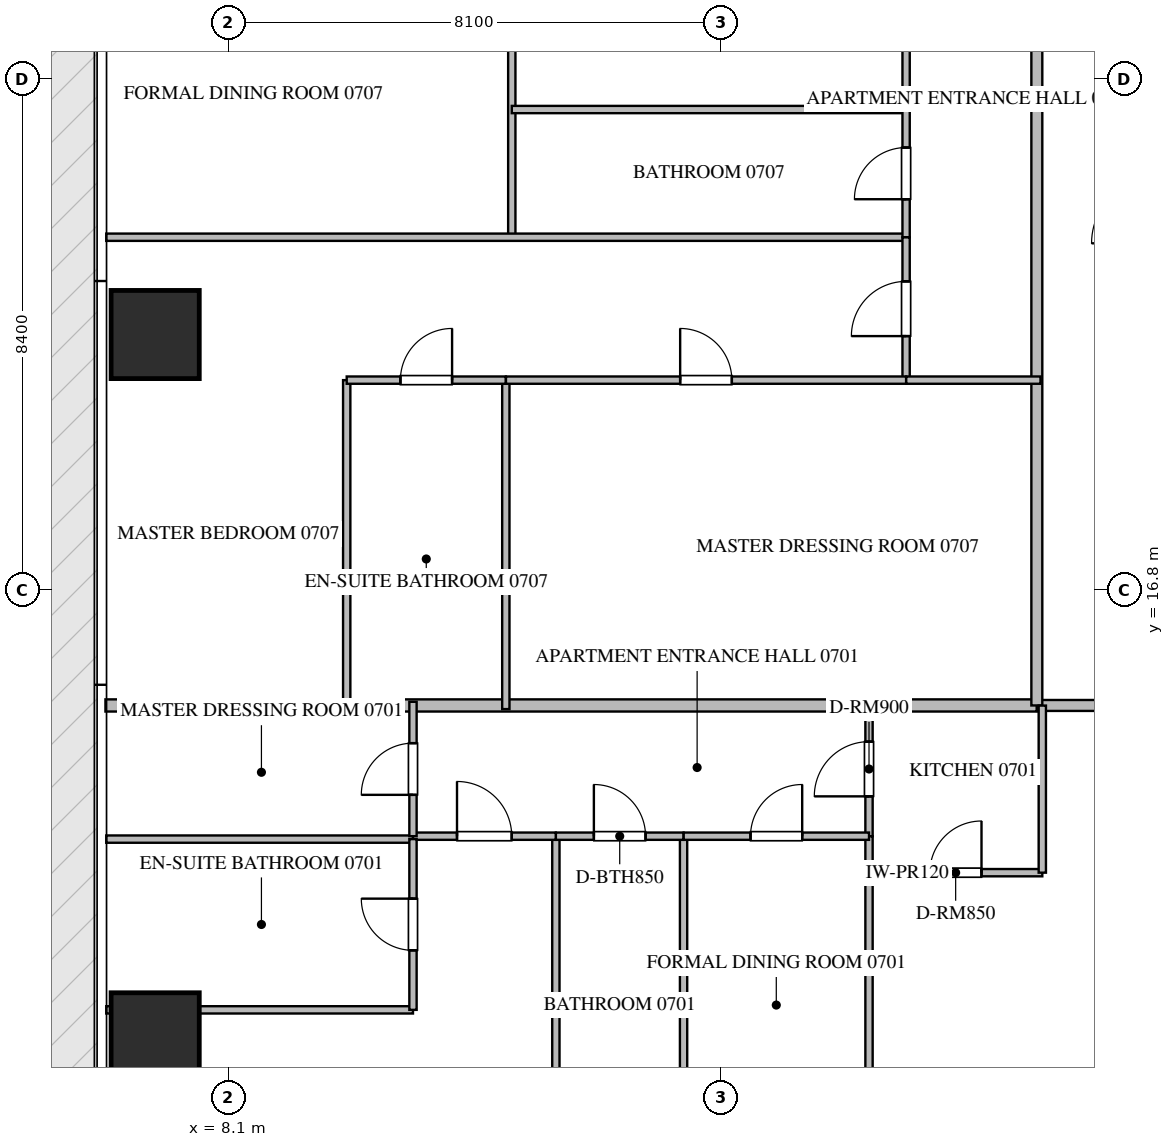
"""IFC4 building model, lengths in metres.
Left out: names, types, materials, properties, quantities, classifications, styles, units other than length and angle.
Written with IfcOpenShell. Run it as: python <this file> out.ifc"""

import sys

from ifc_helpers import new_model, si_unit, direction, frame, frame_2d, origin, origin_2d, place, context, subcontext, project, spatial, rectangle, extrude, source, transform, mapped, element, fill, save


model = new_model("IFC4")
c1 = context("Model", 3, precision=1e-05, world=origin(), true_north=direction((0.0, 1.0)))
c2 = subcontext(c1, "Body", "Model", "MODEL_VIEW")
j1 = project(units=[si_unit("LENGTHUNIT", "METRE"), si_unit("PLANEANGLEUNIT", "RADIAN")], contexts=[c1])
p1 = place(None, origin())
s1 = spatial("IfcSite", under=j1, at=p1, CompositionType="ELEMENT")
p2 = place(p1, origin())
s2 = spatial("IfcBuilding", under=s1, at=p2, CompositionType="ELEMENT")
p3 = place(p2, frame((0.0, 0.0, 34.2)))
s3 = spatial("IfcBuildingStorey", under=s2, at=p3, CompositionType="ELEMENT", Elevation=34.2)
m1 = source(origin(), c2, "Body", "SweptSolid", [
    extrude(rectangle(XDim=1.45, YDim=1.45, at=origin_2d()), origin(), (0.0, 0.0, 1.0), 3.75),
])
for number, where, z_axis, x_axis in (
    (1, (6.9, 9.45, -0.26), (0.0, 0.0, 1.0), (1.0, 0.0, 0.0)),
    (2, (6.9, 21.0, -0.26), (0.0, 0.0, 1.0), (1.0, 0.0, 0.0)),
):
    element("IfcColumn", number, at=place(p3, frame(where, z_axis=z_axis, x_axis=x_axis)), inside=s3, PredefinedType="COLUMN", context=c2, shape_type="MappedRepresentation", body=[
        mapped(m1, transform((0.0, 0.0, 0.0), scale=1.0)),
    ])
p4 = place(p3, frame((6.082, 14.9, 0.0), z_axis=(0.0, 0.0, 1.0), x_axis=(1.0, 0.0, 0.0)))
e3 = element("IfcWall", 3, at=p4, inside=s3, PredefinedType="PARTITIONING", context=c2, shape_type="SweptSolid", body=[
    extrude(rectangle(XDim=15.318, YDim=0.2, at=frame_2d((7.659, 0.0))), origin(), (0.0, 0.0, 1.0), 3.49),
])
p5 = place(p3, frame((21.402, 14.9, 0.0), z_axis=(0.0, 0.0, 1.0), x_axis=(1.0, 0.0, 0.0)))
e4 = element("IfcWall", 4, at=p5, inside=s3, PredefinedType="PARTITIONING", context=c2, shape_type="SweptSolid", body=[
    extrude(rectangle(XDim=21.996, YDim=0.18, at=frame_2d((10.998, 0.0))), origin(), (0.0, 0.0, 1.0), 3.49),
])
p6 = place(p5, frame((2.1, 0.0, 0.0)))
e5 = element("IfcOpeningElement", 5, at=p6, cuts=e4, PredefinedType="OPENING", context=c2, shape_type="SweptSolid", body=[
    extrude(rectangle(XDim=1.0, YDim=2.15, at=frame_2d((0.5, 1.075))), frame((0.0, 0.1, 0.0), z_axis=(0.0, -1.0, 0.0), x_axis=(1.0, 0.0, 0.0)), (0.0, 0.0, 1.0), 0.2),
])
p7 = place(p5, frame((6.719, 0.0, 0.0)))
e6 = element("IfcOpeningElement", 6, at=p7, cuts=e4, PredefinedType="OPENING", context=c2, shape_type="SweptSolid", body=[
    extrude(rectangle(XDim=1.0, YDim=2.15, at=frame_2d((0.5, 1.075))), frame((0.0, 0.1, 0.0), z_axis=(0.0, -1.0, 0.0), x_axis=(1.0, 0.0, 0.0)), (0.0, 0.0, 1.0), 0.2),
])
p8 = place(p5, frame((18.896, 0.0, 0.0)))
e7 = element("IfcOpeningElement", 7, at=p8, cuts=e4, PredefinedType="OPENING", context=c2, shape_type="SweptSolid", body=[
    extrude(rectangle(XDim=1.0, YDim=2.15, at=frame_2d((0.5, 1.075))), frame((0.0, 0.1, 0.0), z_axis=(0.0, -1.0, 0.0), x_axis=(1.0, 0.0, 0.0)), (0.0, 0.0, 1.0), 0.2),
])
p9 = place(p3, frame((21.4, 14.9, 0.0), z_axis=(0.0, 0.0, 1.0), x_axis=(0.0, 1.0, 0.0)))
e8 = element("IfcWall", 8, at=p9, inside=s3, PredefinedType="PARTITIONING", context=c2, shape_type="SweptSolid", body=[
    extrude(rectangle(XDim=20.6, YDim=0.18, at=frame_2d((10.3, 0.0))), origin(), (0.0, 0.0, 1.0), 3.49),
])
p10 = place(p9, frame((17.64, 0.0, 0.0)))
e9 = element("IfcOpeningElement", 9, at=p10, cuts=e8, PredefinedType="OPENING", context=c2, shape_type="SweptSolid", body=[
    extrude(rectangle(XDim=1.0, YDim=2.15, at=frame_2d((0.5, 1.075))), frame((0.0, 0.1, 0.0), z_axis=(0.0, -1.0, 0.0), x_axis=(1.0, 0.0, 0.0)), (0.0, 0.0, 1.0), 0.2),
])
p11 = place(p3, frame((18.64, 12.15, 0.0), z_axis=(0.0, 0.0, 1.0), x_axis=(1.0, 0.0, 0.0)))
e10 = element("IfcWall", 10, at=p11, inside=s3, PredefinedType="PARTITIONING", context=c2, shape_type="SweptSolid", body=[
    extrude(rectangle(XDim=2.85, YDim=0.12, at=frame_2d((1.425, 0.0))), origin(), (0.0, 0.0, 1.0), 3.49),
])
p12 = place(p11, frame((1.0, 0.0, 0.0)))
e11 = element("IfcOpeningElement", 11, at=p12, cuts=e10, PredefinedType="OPENING", context=c2, shape_type="SweptSolid", body=[
    extrude(rectangle(XDim=0.85, YDim=2.1, at=frame_2d((0.425, 1.05))), frame((0.0, 0.07, 0.0), z_axis=(0.0, -1.0, 0.0), x_axis=(1.0, 0.0, 0.0)), (0.0, 0.0, 1.0), 0.14),
])
p13 = place(p3, frame((21.49, 12.15, 0.0), z_axis=(0.0, 0.0, 1.0), x_axis=(0.0, 1.0, 0.0)))
e12 = element("IfcWall", 12, at=p13, inside=s3, PredefinedType="PARTITIONING", context=c2, shape_type="SweptSolid", body=[
    extrude(rectangle(XDim=2.748, YDim=0.12, at=frame_2d((1.374, 0.0))), origin(), (0.0, 0.0, 1.0), 3.49),
])
p14 = place(p3, frame((18.64, 12.75, 0.0), z_axis=(0.0, 0.0, 1.0), x_axis=(0.0, 1.0, 0.0)))
e13 = element("IfcWall", 13, at=p14, inside=s3, PredefinedType="PARTITIONING", context=c2, shape_type="SweptSolid", body=[
    extrude(rectangle(XDim=2.21, YDim=0.12, at=frame_2d((1.105, 0.0))), origin(), (0.0, 0.0, 1.0), 3.49),
])
p15 = place(p14, frame((0.655, 0.0, 0.0)))
e14 = element("IfcOpeningElement", 14, at=p15, cuts=e13, PredefinedType="OPENING", context=c2, shape_type="SweptSolid", body=[
    extrude(rectangle(XDim=0.9, YDim=2.1, at=frame_2d((0.45, 1.05))), frame((0.0, 0.07, 0.0), z_axis=(0.0, -1.0, 0.0), x_axis=(1.0, 0.0, 0.0)), (0.0, 0.0, 1.0), 0.14),
])
p16 = place(p3, frame((18.64, 7.73, 0.0), z_axis=(0.0, 0.0, 1.0), x_axis=(0.0, 1.0, 0.0)))
e15 = element("IfcWall", 15, at=p16, inside=s3, PredefinedType="PARTITIONING", context=c2, shape_type="SweptSolid", body=[
    extrude(rectangle(XDim=5.018, YDim=0.12, at=frame_2d((2.509, 0.0))), origin(), (0.0, 0.0, 1.0), 3.49),
])
p17 = place(p3, frame((13.49, 4.495, 0.0), z_axis=(0.0, 0.0, 1.0), x_axis=(0.0, 1.0, 0.0)))
e16 = element("IfcWall", 16, at=p17, inside=s3, PredefinedType="PARTITIONING", context=c2, shape_type="SweptSolid", body=[
    extrude(rectangle(XDim=8.255, YDim=0.12, at=frame_2d((4.127, 0.0))), origin(), (0.0, 0.0, 1.0), 3.49),
])
p18 = place(p3, frame((15.59, 7.728, 0.0), z_axis=(0.0, 0.0, 1.0), x_axis=(0.0, 1.0, 0.0)))
e17 = element("IfcWall", 17, at=p18, inside=s3, PredefinedType="PARTITIONING", context=c2, shape_type="SweptSolid", body=[
    extrude(rectangle(XDim=5.022, YDim=0.12, at=frame_2d((2.511, 0.0))), origin(), (0.0, 0.0, 1.0), 3.49),
])
p19 = place(p3, frame((13.49, 12.75, 0.0), z_axis=(0.0, 0.0, 1.0), x_axis=(1.0, 0.0, 0.0)))
e18 = element("IfcWall", 18, at=p19, inside=s3, PredefinedType="PARTITIONING", context=c2, shape_type="SweptSolid", body=[
    extrude(rectangle(XDim=2.1, YDim=0.12, at=frame_2d((1.05, 0.0))), origin(), (0.0, 0.0, 1.0), 3.49),
])
p20 = place(p19, frame((0.625, 0.0, 0.0)))
e19 = element("IfcOpeningElement", 19, at=p20, cuts=e18, PredefinedType="OPENING", context=c2, shape_type="SweptSolid", body=[
    extrude(rectangle(XDim=0.85, YDim=2.1, at=frame_2d((0.425, 1.05))), frame((0.0, 0.07, 0.0), z_axis=(0.0, -1.0, 0.0), x_axis=(1.0, 0.0, 0.0)), (0.0, 0.0, 1.0), 0.14),
])
p21 = place(p3, frame((15.592, 12.75, 0.0), z_axis=(0.0, 0.0, 1.0), x_axis=(1.0, 0.0, 0.0)))
e20 = element("IfcWall", 20, at=p21, inside=s3, PredefinedType="PARTITIONING", context=c2, shape_type="SweptSolid", body=[
    extrude(rectangle(XDim=3.048, YDim=0.12, at=frame_2d((1.524, 0.0))), origin(), (0.0, 0.0, 1.0), 3.49),
])
p22 = place(p21, frame((1.099, 0.0, 0.0)))
e21 = element("IfcOpeningElement", 21, at=p22, cuts=e20, PredefinedType="OPENING", context=c2, shape_type="SweptSolid", body=[
    extrude(rectangle(XDim=0.85, YDim=2.1, at=frame_2d((0.425, 1.05))), frame((0.0, 0.07, 0.0), z_axis=(0.0, -1.0, 0.0), x_axis=(1.0, 0.0, 0.0)), (0.0, 0.0, 1.0), 0.14),
])
p23 = place(p3, frame((11.14, 12.75, 0.0), z_axis=(0.0, 0.0, 1.0), x_axis=(1.0, 0.0, 0.0)))
e22 = element("IfcWall", 22, at=p23, inside=s3, PredefinedType="PARTITIONING", context=c2, shape_type="SweptSolid", body=[
    extrude(rectangle(XDim=2.348, YDim=0.12, at=frame_2d((1.174, 0.0))), origin(), (0.0, 0.0, 1.0), 3.49),
])
p24 = place(p23, frame((0.724, 0.0, 0.0)))
e23 = element("IfcOpeningElement", 23, at=p24, cuts=e22, PredefinedType="OPENING", context=c2, shape_type="SweptSolid", body=[
    extrude(rectangle(XDim=0.9, YDim=2.1, at=frame_2d((0.45, 1.05))), frame((0.0, 0.07, 0.0), z_axis=(0.0, -1.0, 0.0), x_axis=(1.0, 0.0, 0.0)), (0.0, 0.0, 1.0), 0.14),
])
p25 = place(p3, frame((6.095, 9.894, 0.0), z_axis=(0.0, 0.0, 1.0), x_axis=(1.0, 0.0, 0.0)))
e24 = element("IfcWall", 24, at=p25, inside=s3, PredefinedType="PARTITIONING", context=c2, shape_type="SweptSolid", body=[
    extrude(rectangle(XDim=5.045, YDim=0.12, at=frame_2d((2.522, 0.0))), origin(), (0.0, 0.0, 1.0), 3.49),
])
p26 = place(p3, frame((6.095, 12.702, 0.0), z_axis=(0.0, 0.0, 1.0), x_axis=(1.0, 0.0, 0.0)))
e25 = element("IfcWall", 25, at=p26, inside=s3, PredefinedType="PARTITIONING", context=c2, shape_type="SweptSolid", body=[
    extrude(rectangle(XDim=5.043, YDim=0.12, at=frame_2d((2.521, 0.0))), origin(), (0.0, 0.0, 1.0), 3.49),
])
p27 = place(p3, frame((11.14, 9.894, 0.0), z_axis=(0.0, 0.0, 1.0), x_axis=(0.0, 1.0, 0.0)))
e26 = element("IfcWall", 26, at=p27, inside=s3, PredefinedType="PARTITIONING", context=c2, shape_type="SweptSolid", body=[
    extrude(rectangle(XDim=2.808, YDim=0.12, at=frame_2d((1.404, 0.0))), origin(), (0.0, 0.0, 1.0), 3.49),
])
p28 = place(p27, frame((0.979, 0.0, 0.0)))
e27 = element("IfcOpeningElement", 27, at=p28, cuts=e26, PredefinedType="OPENING", context=c2, shape_type="SweptSolid", body=[
    extrude(rectangle(XDim=0.85, YDim=2.1, at=frame_2d((0.425, 1.05))), frame((0.0, 0.07, 0.0), z_axis=(0.0, -1.0, 0.0), x_axis=(1.0, 0.0, 0.0)), (0.0, 0.0, 1.0), 0.14),
])
p29 = place(p3, frame((11.14, 12.75, 0.0), z_axis=(0.0, 0.0, 1.0), x_axis=(0.0, 1.0, 0.0)))
e28 = element("IfcWall", 28, at=p29, inside=s3, PredefinedType="PARTITIONING", context=c2, shape_type="SweptSolid", body=[
    extrude(rectangle(XDim=2.21, YDim=0.12, at=frame_2d((1.105, 0.0))), origin(), (0.0, 0.0, 1.0), 3.49),
])
p30 = place(p29, frame((0.68, 0.0, 0.0)))
e29 = element("IfcOpeningElement", 29, at=p30, cuts=e28, PredefinedType="OPENING", context=c2, shape_type="SweptSolid", body=[
    extrude(rectangle(XDim=0.85, YDim=2.1, at=frame_2d((0.425, 1.05))), frame((0.0, 0.07, 0.0), z_axis=(0.0, -1.0, 0.0), x_axis=(1.0, 0.0, 0.0)), (0.0, 0.0, 1.0), 0.14),
])
p31 = place(p3, frame((12.765, 22.6, 0.0), z_axis=(0.0, 0.0, 1.0), x_axis=(0.0, 1.0, 0.0)))
e30 = element("IfcWall", 30, at=p31, inside=s3, PredefinedType="PARTITIONING", context=c2, shape_type="SweptSolid", body=[
    extrude(rectangle(XDim=5.07, YDim=0.12, at=frame_2d((2.535, 0.0))), origin(), (0.0, 0.0, 1.0), 3.49),
])
p32 = place(p3, frame((6.095, 22.6, 0.0), z_axis=(0.0, 0.0, 1.0), x_axis=(1.0, 0.0, 0.0)))
e31 = element("IfcWall", 31, at=p32, inside=s3, PredefinedType="PARTITIONING", context=c2, shape_type="SweptSolid", body=[
    extrude(rectangle(XDim=13.155, YDim=0.12, at=frame_2d((6.578, 0.0))), origin(), (0.0, 0.0, 1.0), 3.49),
])
p33 = place(p3, frame((12.765, 24.7, 0.0), z_axis=(0.0, 0.0, 1.0), x_axis=(1.0, 0.0, 0.0)))
e32 = element("IfcWall", 32, at=p33, inside=s3, PredefinedType="PARTITIONING", context=c2, shape_type="SweptSolid", body=[
    extrude(rectangle(XDim=6.485, YDim=0.12, at=frame_2d((3.243, 0.0))), origin(), (0.0, 0.0, 1.0), 3.49),
])
p34 = place(p3, frame((19.25, 22.6, 0.0), z_axis=(0.0, 0.0, 1.0), x_axis=(0.0, 1.0, 0.0)))
e33 = element("IfcWall", 33, at=p34, inside=s3, PredefinedType="PARTITIONING", context=c2, shape_type="SweptSolid", body=[
    extrude(rectangle(XDim=2.1, YDim=0.12, at=frame_2d((1.05, 0.0))), origin(), (0.0, 0.0, 1.0), 3.49),
])
p35 = place(p34, frame((0.625, 0.0, 0.0)))
e34 = element("IfcOpeningElement", 34, at=p35, cuts=e33, PredefinedType="OPENING", context=c2, shape_type="SweptSolid", body=[
    extrude(rectangle(XDim=0.85, YDim=2.1, at=frame_2d((0.425, 1.05))), frame((0.0, 0.07, 0.0), z_axis=(0.0, -1.0, 0.0), x_axis=(1.0, 0.0, 0.0)), (0.0, 0.0, 1.0), 0.14),
])
p36 = place(p3, frame((19.25, 24.702, 0.0), z_axis=(0.0, 0.0, 1.0), x_axis=(0.0, 1.0, 0.0)))
e35 = element("IfcWall", 35, at=p36, inside=s3, PredefinedType="PARTITIONING", context=c2, shape_type="SweptSolid", body=[
    extrude(rectangle(XDim=2.968, YDim=0.12, at=frame_2d((1.484, 0.0))), origin(), (0.0, 0.0, 1.0), 3.49),
])
p37 = place(p36, frame((1.059, 0.0, 0.0)))
e36 = element("IfcOpeningElement", 36, at=p37, cuts=e35, PredefinedType="OPENING", context=c2, shape_type="SweptSolid", body=[
    extrude(rectangle(XDim=0.85, YDim=2.1, at=frame_2d((0.425, 1.05))), frame((0.0, 0.07, 0.0), z_axis=(0.0, -1.0, 0.0), x_axis=(1.0, 0.0, 0.0)), (0.0, 0.0, 1.0), 0.14),
])
p38 = place(p3, frame((19.25, 20.25, 0.0), z_axis=(0.0, 0.0, 1.0), x_axis=(0.0, 1.0, 0.0)))
e37 = element("IfcWall", 37, at=p38, inside=s3, PredefinedType="PARTITIONING", context=c2, shape_type="SweptSolid", body=[
    extrude(rectangle(XDim=2.348, YDim=0.12, at=frame_2d((1.174, 0.0))), origin(), (0.0, 0.0, 1.0), 3.49),
])
p39 = place(p38, frame((0.724, 0.0, 0.0)))
e38 = element("IfcOpeningElement", 38, at=p39, cuts=e37, PredefinedType="OPENING", context=c2, shape_type="SweptSolid", body=[
    extrude(rectangle(XDim=0.9, YDim=2.1, at=frame_2d((0.45, 1.05))), frame((0.0, 0.07, 0.0), z_axis=(0.0, -1.0, 0.0), x_axis=(1.0, 0.0, 0.0)), (0.0, 0.0, 1.0), 0.14),
])
for number, where, z_axis, x_axis in (
    (39, (10.05, 14.84, 0.0), (0.0, 0.0, 1.0), (0.0, 1.0, 0.0)),
    (40, (12.667, 14.84, 0.0), (0.0, 0.0, 1.0), (0.0, 1.0, 0.0)),
):
    element("IfcWall", number, at=place(p3, frame(where, z_axis=z_axis, x_axis=x_axis)), inside=s3, PredefinedType="PARTITIONING", context=c2, shape_type="SweptSolid", body=[
        extrude(rectangle(XDim=5.41, YDim=0.12, at=frame_2d((2.705, 0.0))), origin(), (0.0, 0.0, 1.0), 3.49),
    ])
p40 = place(p3, frame((10.05, 20.25, 0.0), z_axis=(0.0, 0.0, 1.0), x_axis=(1.0, 0.0, 0.0)))
e41 = element("IfcWall", 41, at=p40, inside=s3, PredefinedType="PARTITIONING", context=c2, shape_type="SweptSolid", body=[
    extrude(rectangle(XDim=2.617, YDim=0.12, at=frame_2d((1.309, 0.0))), origin(), (0.0, 0.0, 1.0), 3.49),
])
p41 = place(p40, frame((0.883, 0.0, 0.0)))
e42 = element("IfcOpeningElement", 42, at=p41, cuts=e41, PredefinedType="OPENING", context=c2, shape_type="SweptSolid", body=[
    extrude(rectangle(XDim=0.85, YDim=2.1, at=frame_2d((0.425, 1.05))), frame((0.0, 0.07, 0.0), z_axis=(0.0, -1.0, 0.0), x_axis=(1.0, 0.0, 0.0)), (0.0, 0.0, 1.0), 0.14),
])
p42 = place(p3, frame((12.669, 20.25, 0.0), z_axis=(0.0, 0.0, 1.0), x_axis=(1.0, 0.0, 0.0)))
e43 = element("IfcWall", 43, at=p42, inside=s3, PredefinedType="PARTITIONING", context=c2, shape_type="SweptSolid", body=[
    extrude(rectangle(XDim=6.581, YDim=0.12, at=frame_2d((3.291, 0.0))), origin(), (0.0, 0.0, 1.0), 3.49),
])
p43 = place(p42, frame((2.865, 0.0, 0.0)))
e44 = element("IfcOpeningElement", 44, at=p43, cuts=e43, PredefinedType="OPENING", context=c2, shape_type="SweptSolid", body=[
    extrude(rectangle(XDim=0.85, YDim=2.1, at=frame_2d((0.425, 1.05))), frame((0.0, 0.07, 0.0), z_axis=(0.0, -1.0, 0.0), x_axis=(1.0, 0.0, 0.0)), (0.0, 0.0, 1.0), 0.14),
])
p44 = place(p3, frame((19.252, 20.25, 0.0), z_axis=(0.0, 0.0, 1.0), x_axis=(1.0, 0.0, 0.0)))
e45 = element("IfcWall", 45, at=p44, inside=s3, PredefinedType="PARTITIONING", context=c2, shape_type="SweptSolid", body=[
    extrude(rectangle(XDim=2.208, YDim=0.12, at=frame_2d((1.104, 0.0))), origin(), (0.0, 0.0, 1.0), 3.49),
])
m2 = source(origin(), c2, "Body", "SweptSolid", [
    extrude(rectangle(XDim=0.85, YDim=2.1, at=frame_2d((0.425, 1.05))), frame((0.0, 0.025, 0.0), z_axis=(0.0, -1.0, 0.0), x_axis=(1.0, 0.0, 0.0)), (0.0, 0.0, 1.0), 0.05),
])
p45 = place(p12, origin())
e46 = element("IfcDoor", 46, at=p45, inside=s3, OperationType="SINGLE_SWING_RIGHT", PredefinedType="DOOR", context=c2, shape_type="MappedRepresentation", body=[
    mapped(m2, transform((0.0, 0.0, 0.0), scale=1.0)),
])
fill(e11, e46)
m3 = source(origin(), c2, "Body", "SweptSolid", [
    extrude(rectangle(XDim=0.9, YDim=2.1, at=frame_2d((0.45, 1.05))), frame((0.0, 0.025, 0.0), z_axis=(0.0, -1.0, 0.0), x_axis=(1.0, 0.0, 0.0)), (0.0, 0.0, 1.0), 0.05),
])
p46 = place(p15, origin())
e47 = element("IfcDoor", 47, at=p46, inside=s3, OperationType="SINGLE_SWING_LEFT", PredefinedType="DOOR", context=c2, shape_type="MappedRepresentation", body=[
    mapped(m3, transform((0.0, 0.0, 0.0), scale=1.0)),
])
fill(e14, e47)
p47 = place(p20, origin())
e48 = element("IfcDoor", 48, at=p47, inside=s3, OperationType="SINGLE_SWING_LEFT", PredefinedType="DOOR", context=c2, shape_type="MappedRepresentation", body=[
    mapped(m2, transform((0.0, 0.0, 0.0), scale=1.0)),
])
fill(e19, e48)
p48 = place(p22, origin())
e49 = element("IfcDoor", 49, at=p48, inside=s3, OperationType="SINGLE_SWING_RIGHT", PredefinedType="DOOR", context=c2, shape_type="MappedRepresentation", body=[
    mapped(m2, transform((0.0, 0.0, 0.0), scale=1.0)),
])
fill(e21, e49)
p49 = place(p24, origin())
e50 = element("IfcDoor", 50, at=p49, inside=s3, OperationType="SINGLE_SWING_LEFT", PredefinedType="DOOR", context=c2, shape_type="MappedRepresentation", body=[
    mapped(m3, transform((0.0, 0.0, 0.0), scale=1.0)),
])
fill(e23, e50)
p50 = place(p28, origin())
e51 = element("IfcDoor", 51, at=p50, inside=s3, OperationType="SINGLE_SWING_RIGHT", PredefinedType="DOOR", context=c2, shape_type="MappedRepresentation", body=[
    mapped(m2, transform((0.0, 0.0, 0.0), scale=1.0)),
])
fill(e27, e51)
p51 = place(p30, origin())
e52 = element("IfcDoor", 52, at=p51, inside=s3, OperationType="SINGLE_SWING_LEFT", PredefinedType="DOOR", context=c2, shape_type="MappedRepresentation", body=[
    mapped(m2, transform((0.0, 0.0, 0.0), scale=1.0)),
])
fill(e29, e52)
p52 = place(p35, origin())
e53 = element("IfcDoor", 53, at=p52, inside=s3, OperationType="SINGLE_SWING_LEFT", PredefinedType="DOOR", context=c2, shape_type="MappedRepresentation", body=[
    mapped(m2, transform((0.0, 0.0, 0.0), scale=1.0)),
])
fill(e34, e53)
p53 = place(p39, origin())
e54 = element("IfcDoor", 54, at=p53, inside=s3, OperationType="SINGLE_SWING_LEFT", PredefinedType="DOOR", context=c2, shape_type="MappedRepresentation", body=[
    mapped(m3, transform((0.0, 0.0, 0.0), scale=1.0)),
])
fill(e38, e54)
p54 = place(p41, origin())
e55 = element("IfcDoor", 55, at=p54, inside=s3, OperationType="SINGLE_SWING_RIGHT", PredefinedType="DOOR", context=c2, shape_type="MappedRepresentation", body=[
    mapped(m2, transform((0.0, 0.0, 0.0), scale=1.0)),
])
fill(e42, e55)
p55 = place(p43, origin())
e56 = element("IfcDoor", 56, at=p55, inside=s3, OperationType="SINGLE_SWING_LEFT", PredefinedType="DOOR", context=c2, shape_type="MappedRepresentation", body=[
    mapped(m2, transform((0.0, 0.0, 0.0), scale=1.0)),
])
fill(e44, e56)
save(model, sys.argv[1])
